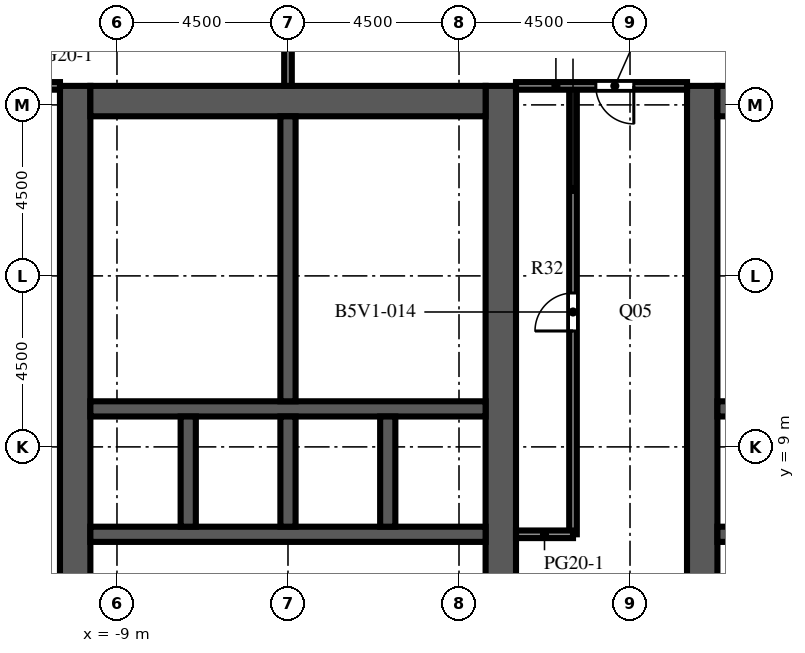
"""IFC4 building model, lengths in metres.
Left out: names, types, materials, properties, quantities, classifications, styles, units other than length and angle.
Written with IfcOpenShell. Run it as: python <this file> out.ifc"""

import sys

from ifc_helpers import new_model, si_unit, direction, frame, frame_2d, origin, place, context, subcontext, project, spatial, rectangle, extrude, element, fill, save


model = new_model("IFC4")
c1 = context("Model", 3, precision=1e-05, world=origin(), true_north=direction((0.0, 1.0)))
c2 = subcontext(c1, "Body", "Model", "MODEL_VIEW")
j1 = project(units=[si_unit("LENGTHUNIT", "METRE"), si_unit("PLANEANGLEUNIT", "RADIAN")], contexts=[c1])
p1 = place(None, origin())
s1 = spatial("IfcSite", under=j1, at=p1, CompositionType="ELEMENT")
p2 = place(p1, origin())
s2 = spatial("IfcBuilding", under=s1, at=p2, CompositionType="ELEMENT")
p3 = place(p2, frame((0.0, 0.0, 165.0)))
s3 = spatial("IfcBuildingStorey", under=s2, at=p3, CompositionType="ELEMENT", Elevation=165.0)
p4 = place(p3, frame((-10.1, -9.0, 0.0), z_axis=(0.0, 0.0, 1.0), x_axis=(0.0, 1.0, 0.0)))
e1 = element("IfcWall", 1, at=p4, inside=s3, PredefinedType="SHEAR", context=c2, shape_type="SweptSolid", body=[
    extrude(rectangle(XDim=27.5, YDim=0.8, at=frame_2d((13.75, 0.0))), origin(), (0.0, 0.0, 1.0), 4.1),
])
p5 = place(p4, frame((12.55, 0.0, 0.0)))
e2 = element("IfcOpeningElement", 2, at=p5, cuts=e1, PredefinedType="OPENING", context=c2, shape_type="SweptSolid", body=[
    extrude(rectangle(XDim=2.4, YDim=2.4, at=frame_2d((1.2, 1.2))), frame((0.0, 0.41, 0.0), z_axis=(0.0, -1.0, 0.0), x_axis=(1.0, 0.0, 0.0)), (0.0, 0.0, 1.0), 0.82),
])
p6 = place(p4, frame((6.825, 0.0, 0.0)))
e3 = element("IfcOpeningElement", 3, at=p6, cuts=e1, PredefinedType="OPENING", context=c2, shape_type="SweptSolid", body=[
    extrude(rectangle(XDim=1.2, YDim=2.1, at=frame_2d((0.6, 1.05))), frame((0.0, 0.41, 0.0), z_axis=(0.0, -1.0, 0.0), x_axis=(1.0, 0.0, 0.0)), (0.0, 0.0, 1.0), 0.82),
])
p7 = place(p4, frame((19.475, 0.0, 0.0)))
e4 = element("IfcOpeningElement", 4, at=p7, cuts=e1, PredefinedType="OPENING", context=c2, shape_type="SweptSolid", body=[
    extrude(rectangle(XDim=1.2, YDim=2.1, at=frame_2d((0.6, 1.05))), frame((0.0, 0.41, 0.0), z_axis=(0.0, -1.0, 0.0), x_axis=(1.0, 0.0, 0.0)), (0.0, 0.0, 1.0), 0.82),
])
p8 = place(p3, frame((1.1, -9.0, 0.0), z_axis=(0.0, 0.0, 1.0), x_axis=(0.0, 1.0, 0.0)))
e5 = element("IfcWall", 5, at=p8, inside=s3, PredefinedType="SHEAR", context=c2, shape_type="SweptSolid", body=[
    extrude(rectangle(XDim=27.5, YDim=0.8, at=frame_2d((13.75, 0.0))), origin(), (0.0, 0.0, 1.0), 4.1),
])
p9 = place(p8, frame((12.55, 0.0, 0.0)))
e6 = element("IfcOpeningElement", 6, at=p9, cuts=e5, PredefinedType="OPENING", context=c2, shape_type="SweptSolid", body=[
    extrude(rectangle(XDim=2.4, YDim=2.4, at=frame_2d((1.2, 1.2))), frame((0.0, 0.41, 0.0), z_axis=(0.0, -1.0, 0.0), x_axis=(1.0, 0.0, 0.0)), (0.0, 0.0, 1.0), 0.82),
])
p10 = place(p8, frame((3.95, 0.0, 0.0)))
e7 = element("IfcOpeningElement", 7, at=p10, cuts=e5, PredefinedType="OPENING", context=c2, shape_type="SweptSolid", body=[
    extrude(rectangle(XDim=1.2, YDim=2.1, at=frame_2d((0.6, 1.05))), frame((0.0, 0.41, 0.0), z_axis=(0.0, -1.0, 0.0), x_axis=(1.0, 0.0, 0.0)), (0.0, 0.0, 1.0), 0.82),
])
p11 = place(p8, frame((22.35, 0.0, 0.0)))
e8 = element("IfcOpeningElement", 8, at=p11, cuts=e5, PredefinedType="OPENING", context=c2, shape_type="SweptSolid", body=[
    extrude(rectangle(XDim=1.2, YDim=2.1, at=frame_2d((0.6, 1.05))), frame((0.0, 0.41, 0.0), z_axis=(0.0, -1.0, 0.0), x_axis=(1.0, 0.0, 0.0)), (0.0, 0.0, 1.0), 0.82),
])
p12 = place(p3, frame((-9.7, 18.1, 0.0), z_axis=(0.0, 0.0, 1.0), x_axis=(1.0, 0.0, 0.0)))
e9 = element("IfcWall", 9, at=p12, inside=s3, PredefinedType="SHEAR", context=c2, shape_type="SweptSolid", body=[
    extrude(rectangle(XDim=10.4, YDim=0.8, at=frame_2d((5.2, 0.0))), origin(), (0.0, 0.0, 1.0), 4.1),
])
p13 = place(p3, frame((-9.7, 6.7, 0.0), z_axis=(0.0, 0.0, 1.0), x_axis=(1.0, 0.0, 0.0)))
e10 = element("IfcWall", 10, at=p13, inside=s3, PredefinedType="SHEAR", context=c2, shape_type="SweptSolid", body=[
    extrude(rectangle(XDim=10.4, YDim=0.4, at=frame_2d((5.2, 0.0))), origin(), (0.0, 0.0, 1.0), 4.1),
])
p14 = place(p13, frame((3.337, 0.0, 0.0)))
e11 = element("IfcOpeningElement", 11, at=p14, cuts=e10, PredefinedType="OPENING", context=c2, shape_type="SweptSolid", body=[
    extrude(rectangle(XDim=1.1, YDim=2.1, at=frame_2d((0.55, 1.05))), frame((0.0, 0.21, 0.0), z_axis=(0.0, -1.0, 0.0), x_axis=(1.0, 0.0, 0.0)), (0.0, 0.0, 1.0), 0.42),
])
p15 = place(p13, frame((5.962, 0.0, 0.0)))
e12 = element("IfcOpeningElement", 12, at=p15, cuts=e10, PredefinedType="OPENING", context=c2, shape_type="SweptSolid", body=[
    extrude(rectangle(XDim=1.1, YDim=2.1, at=frame_2d((0.55, 1.05))), frame((0.0, 0.21, 0.0), z_axis=(0.0, -1.0, 0.0), x_axis=(1.0, 0.0, 0.0)), (0.0, 0.0, 1.0), 0.42),
])
p16 = place(p13, frame((8.663, 0.0, 0.0)))
e13 = element("IfcOpeningElement", 13, at=p16, cuts=e10, PredefinedType="OPENING", context=c2, shape_type="SweptSolid", body=[
    extrude(rectangle(XDim=1.1, YDim=2.1, at=frame_2d((0.55, 1.05))), frame((0.0, 0.21, 0.0), z_axis=(0.0, -1.0, 0.0), x_axis=(1.0, 0.0, 0.0)), (0.0, 0.0, 1.0), 0.42),
])
p17 = place(p13, frame((0.688, 0.0, 0.0)))
e14 = element("IfcOpeningElement", 14, at=p17, cuts=e10, PredefinedType="OPENING", context=c2, shape_type="SweptSolid", body=[
    extrude(rectangle(XDim=1.0, YDim=2.1, at=frame_2d((0.5, 1.05))), frame((0.0, 0.21, 0.0), z_axis=(0.0, -1.0, 0.0), x_axis=(1.0, 0.0, 0.0)), (0.0, 0.0, 1.0), 0.42),
])
p18 = place(p3, frame((-9.7, 10.0, 0.0), z_axis=(0.0, 0.0, 1.0), x_axis=(1.0, 0.0, 0.0)))
e15 = element("IfcWall", 15, at=p18, inside=s3, PredefinedType="SHEAR", context=c2, shape_type="SweptSolid", body=[
    extrude(rectangle(XDim=10.4, YDim=0.4, at=frame_2d((5.2, 0.0))), origin(), (0.0, 0.0, 1.0), 4.1),
])
for number, where, z_axis, x_axis in (
    (16, (-7.125, 6.9, 0.0), (0.0, 0.0, 1.0), (0.0, 1.0, 0.0)),
    (17, (-4.5, 6.9, 0.0), (0.0, 0.0, 1.0), (0.0, 1.0, 0.0)),
    (18, (-1.875, 6.9, 0.0), (0.0, 0.0, 1.0), (0.0, 1.0, 0.0)),
):
    element("IfcWall", number, at=place(p3, frame(where, z_axis=z_axis, x_axis=x_axis)), inside=s3, PredefinedType="SHEAR", context=c2, shape_type="SweptSolid", body=[
        extrude(rectangle(XDim=2.9, YDim=0.4, at=frame_2d((1.45, 0.0))), origin(), (0.0, 0.0, 1.0), 4.1),
    ])
p19 = place(p3, frame((-4.5, 10.2, 0.0), z_axis=(0.0, 0.0, 1.0), x_axis=(0.0, 1.0, 0.0)))
e19 = element("IfcWall", 19, at=p19, inside=s3, PredefinedType="SHEAR", context=c2, shape_type="SweptSolid", body=[
    extrude(rectangle(XDim=7.5, YDim=0.4, at=frame_2d((3.75, 0.0))), origin(), (0.0, 0.0, 1.0), 4.1),
])
p20 = place(p3, frame((6.4, -9.0, 0.0), z_axis=(0.0, 0.0, 1.0), x_axis=(0.0, 1.0, 0.0)))
e20 = element("IfcWall", 20, at=p20, inside=s3, PredefinedType="SHEAR", context=c2, shape_type="SweptSolid", body=[
    extrude(rectangle(XDim=27.5, YDim=0.8, at=frame_2d((13.75, 0.0))), origin(), (0.0, 0.0, 1.0), 4.1),
])
p21 = place(p20, frame((12.55, 0.0, 0.0)))
e21 = element("IfcOpeningElement", 21, at=p21, cuts=e20, PredefinedType="OPENING", context=c2, shape_type="SweptSolid", body=[
    extrude(rectangle(XDim=2.4, YDim=2.4, at=frame_2d((1.2, 1.2))), frame((0.0, 0.41, 0.0), z_axis=(0.0, -1.0, 0.0), x_axis=(1.0, 0.0, 0.0)), (0.0, 0.0, 1.0), 0.82),
])
p22 = place(p20, frame((3.95, 0.0, 0.0)))
e22 = element("IfcOpeningElement", 22, at=p22, cuts=e20, PredefinedType="OPENING", context=c2, shape_type="SweptSolid", body=[
    extrude(rectangle(XDim=1.2, YDim=2.1, at=frame_2d((0.6, 1.05))), frame((0.0, 0.41, 0.0), z_axis=(0.0, -1.0, 0.0), x_axis=(1.0, 0.0, 0.0)), (0.0, 0.0, 1.0), 0.82),
])
p23 = place(p20, frame((22.35, 0.0, 0.0)))
e23 = element("IfcOpeningElement", 23, at=p23, cuts=e20, PredefinedType="OPENING", context=c2, shape_type="SweptSolid", body=[
    extrude(rectangle(XDim=1.2, YDim=2.1, at=frame_2d((0.6, 1.05))), frame((0.0, 0.41, 0.0), z_axis=(0.0, -1.0, 0.0), x_axis=(1.0, 0.0, 0.0)), (0.0, 0.0, 1.0), 0.82),
])
p24 = place(p3, frame((6.8, 18.1, 0.0), z_axis=(0.0, 0.0, 1.0), x_axis=(1.0, 0.0, 0.0)))
e24 = element("IfcWall", 24, at=p24, inside=s3, PredefinedType="SHEAR", context=c2, shape_type="SweptSolid", body=[
    extrude(rectangle(XDim=10.4, YDim=0.8, at=frame_2d((5.2, 0.0))), origin(), (0.0, 0.0, 1.0), 4.1),
])
p25 = place(p3, frame((6.8, 6.7, 0.0), z_axis=(0.0, 0.0, 1.0), x_axis=(1.0, 0.0, 0.0)))
e25 = element("IfcWall", 25, at=p25, inside=s3, PredefinedType="SHEAR", context=c2, shape_type="SweptSolid", body=[
    extrude(rectangle(XDim=10.4, YDim=0.4, at=frame_2d((5.2, 0.0))), origin(), (0.0, 0.0, 1.0), 4.1),
])
p26 = place(p25, frame((3.337, 0.0, 0.0)))
e26 = element("IfcOpeningElement", 26, at=p26, cuts=e25, PredefinedType="OPENING", context=c2, shape_type="SweptSolid", body=[
    extrude(rectangle(XDim=1.1, YDim=2.1, at=frame_2d((0.55, 1.05))), frame((0.0, 0.21, 0.0), z_axis=(0.0, -1.0, 0.0), x_axis=(1.0, 0.0, 0.0)), (0.0, 0.0, 1.0), 0.42),
])
p27 = place(p25, frame((5.962, 0.0, 0.0)))
e27 = element("IfcOpeningElement", 27, at=p27, cuts=e25, PredefinedType="OPENING", context=c2, shape_type="SweptSolid", body=[
    extrude(rectangle(XDim=1.1, YDim=2.1, at=frame_2d((0.55, 1.05))), frame((0.0, 0.21, 0.0), z_axis=(0.0, -1.0, 0.0), x_axis=(1.0, 0.0, 0.0)), (0.0, 0.0, 1.0), 0.42),
])
p28 = place(p25, frame((8.663, 0.0, 0.0)))
e28 = element("IfcOpeningElement", 28, at=p28, cuts=e25, PredefinedType="OPENING", context=c2, shape_type="SweptSolid", body=[
    extrude(rectangle(XDim=1.1, YDim=2.1, at=frame_2d((0.55, 1.05))), frame((0.0, 0.21, 0.0), z_axis=(0.0, -1.0, 0.0), x_axis=(1.0, 0.0, 0.0)), (0.0, 0.0, 1.0), 0.42),
])
p29 = place(p25, frame((0.688, 0.0, 0.0)))
e29 = element("IfcOpeningElement", 29, at=p29, cuts=e25, PredefinedType="OPENING", context=c2, shape_type="SweptSolid", body=[
    extrude(rectangle(XDim=1.0, YDim=2.1, at=frame_2d((0.5, 1.05))), frame((0.0, 0.21, 0.0), z_axis=(0.0, -1.0, 0.0), x_axis=(1.0, 0.0, 0.0)), (0.0, 0.0, 1.0), 0.42),
])
p30 = place(p3, frame((6.8, 10.0, 0.0), z_axis=(0.0, 0.0, 1.0), x_axis=(1.0, 0.0, 0.0)))
e30 = element("IfcWall", 30, at=p30, inside=s3, PredefinedType="SHEAR", context=c2, shape_type="SweptSolid", body=[
    extrude(rectangle(XDim=10.4, YDim=0.4, at=frame_2d((5.2, 0.0))), origin(), (0.0, 0.0, 1.0), 4.1),
])
p31 = place(p3, frame((-0.7, 10.2, 0.0), z_axis=(0.0, 0.0, 1.0), x_axis=(0.0, 1.0, 0.0)))
e31 = element("IfcWall", 31, at=p31, inside=s3, PredefinedType="PARTITIONING", context=c2, shape_type="SweptSolid", body=[
    extrude(rectangle(XDim=2.25, YDim=0.1, at=frame_2d((1.125, 0.0))), origin(), (0.0, 0.0, 1.0), 3.65),
])
p32 = place(p31, frame((0.625, 0.0, 0.0)))
e32 = element("IfcOpeningElement", 32, at=p32, cuts=e31, PredefinedType="OPENING", context=c2, shape_type="SweptSolid", body=[
    extrude(rectangle(XDim=1.0, YDim=2.1, at=frame_2d((0.5, 1.05))), frame((0.0, 0.06, 0.0), z_axis=(0.0, -1.0, 0.0), x_axis=(1.0, 0.0, 0.0)), (0.0, 0.0, 1.0), 0.12),
])
p33 = place(p3, frame((-0.7, 12.45, 0.0), z_axis=(0.0, 0.0, 1.0), x_axis=(0.0, 1.0, 0.0)))
e33 = element("IfcWall", 33, at=p33, inside=s3, PredefinedType="PARTITIONING", context=c2, shape_type="SweptSolid", body=[
    extrude(rectangle(XDim=2.4, YDim=0.1, at=frame_2d((1.2, 0.0))), origin(), (0.0, 0.0, 1.0), 3.65),
])
p34 = place(p33, frame((0.7, 0.0, 0.0)))
e34 = element("IfcOpeningElement", 34, at=p34, cuts=e33, PredefinedType="OPENING", context=c2, shape_type="SweptSolid", body=[
    extrude(rectangle(XDim=1.0, YDim=2.1, at=frame_2d((0.5, 1.05))), frame((0.0, 0.06, 0.0), z_axis=(0.0, -1.0, 0.0), x_axis=(1.0, 0.0, 0.0)), (0.0, 0.0, 1.0), 0.12),
])
p35 = place(p3, frame((-0.7, 14.85, 0.0), z_axis=(0.0, 0.0, 1.0), x_axis=(0.0, 1.0, 0.0)))
e35 = element("IfcWall", 35, at=p35, inside=s3, PredefinedType="PARTITIONING", context=c2, shape_type="SweptSolid", body=[
    extrude(rectangle(XDim=2.85, YDim=0.1, at=frame_2d((1.425, 0.0))), origin(), (0.0, 0.0, 1.0), 3.65),
])
p36 = place(p35, frame((0.925, 0.0, 0.0)))
e36 = element("IfcOpeningElement", 36, at=p36, cuts=e35, PredefinedType="OPENING", context=c2, shape_type="SweptSolid", body=[
    extrude(rectangle(XDim=1.0, YDim=2.1, at=frame_2d((0.5, 1.05))), frame((0.0, 0.06, 0.0), z_axis=(0.0, -1.0, 0.0), x_axis=(1.0, 0.0, 0.0)), (0.0, 0.0, 1.0), 0.12),
])
for number, where, z_axis, x_axis in (
    (37, (-4.3, 12.45, 0.0), (0.0, 0.0, 1.0), (1.0, 0.0, 0.0)),
    (38, (-4.3, 14.85, 0.0), (0.0, 0.0, 1.0), (1.0, 0.0, 0.0)),
):
    element("IfcWall", number, at=place(p3, frame(where, z_axis=z_axis, x_axis=x_axis)), inside=s3, PredefinedType="PARTITIONING", context=c2, shape_type="SweptSolid", body=[
        extrude(rectangle(XDim=3.6, YDim=0.1, at=frame_2d((1.8, 0.0))), origin(), (0.0, 0.0, 1.0), 3.65),
    ])
p37 = place(p3, frame((-4.5, 18.5, 0.0), z_axis=(0.0, 0.0, 1.0), x_axis=(0.0, 1.0, 0.0)))
e39 = element("IfcWall", 39, at=p37, inside=s3, PredefinedType="PARTITIONING", context=c2, shape_type="SweptSolid", body=[
    extrude(rectangle(XDim=8.0, YDim=0.2, at=frame_2d((4.0, 0.0))), origin(), (0.0, 0.0, 1.0), 3.65),
])
p38 = place(p3, frame((3.0, 6.7, 0.0), z_axis=(0.0, 0.0, 1.0), x_axis=(0.0, 1.0, 0.0)))
e40 = element("IfcWall", 40, at=p38, inside=s3, PredefinedType="PARTITIONING", context=c2, shape_type="SweptSolid", body=[
    extrude(rectangle(XDim=11.8, YDim=0.2, at=frame_2d((5.9, 0.0))), origin(), (0.0, 0.0, 1.0), 3.65),
])
p39 = place(p38, frame((5.35, 0.0, 0.0)))
e41 = element("IfcOpeningElement", 41, at=p39, cuts=e40, PredefinedType="OPENING", context=c2, shape_type="SweptSolid", body=[
    extrude(rectangle(XDim=1.0, YDim=2.1, at=frame_2d((0.5, 1.05))), frame((0.0, 0.11, 0.0), z_axis=(0.0, -1.0, 0.0), x_axis=(1.0, 0.0, 0.0)), (0.0, 0.0, 1.0), 0.22),
])
p40 = place(p3, frame((1.5, 6.7, 0.0), z_axis=(0.0, 0.0, 1.0), x_axis=(1.0, 0.0, 0.0)))
e42 = element("IfcWall", 42, at=p40, inside=s3, PredefinedType="PARTITIONING", context=c2, shape_type="SweptSolid", body=[
    extrude(rectangle(XDim=1.5, YDim=0.2, at=frame_2d((0.75, 0.0))), origin(), (0.0, 0.0, 1.0), 3.65),
])
p41 = place(p3, frame((-13.5, 18.5, 0.0), z_axis=(0.0, 0.0, 1.0), x_axis=(1.0, 0.0, 0.0)))
e43 = element("IfcWall", 43, at=p41, inside=s3, PredefinedType="PARTITIONING", context=c2, shape_type="SweptSolid", body=[
    extrude(rectangle(XDim=3.0, YDim=0.2, at=frame_2d((1.5, 0.0))), origin(), (0.0, 0.0, 1.0), 3.65),
])
p42 = place(p41, frame((0.6, 0.0, 0.0)))
e44 = element("IfcOpeningElement", 44, at=p42, cuts=e43, PredefinedType="OPENING", context=c2, shape_type="SweptSolid", body=[
    extrude(rectangle(XDim=1.0, YDim=2.1, at=frame_2d((0.5, 1.05))), frame((0.0, 0.11, 0.0), z_axis=(0.0, -1.0, 0.0), x_axis=(1.0, 0.0, 0.0)), (0.0, 0.0, 1.0), 0.22),
])
p43 = place(p3, frame((1.5, 18.5, 0.0), z_axis=(0.0, 0.0, 1.0), x_axis=(1.0, 0.0, 0.0)))
e45 = element("IfcWall", 45, at=p43, inside=s3, PredefinedType="PARTITIONING", context=c2, shape_type="SweptSolid", body=[
    extrude(rectangle(XDim=4.5, YDim=0.2, at=frame_2d((2.25, 0.0))), origin(), (0.0, 0.0, 1.0), 3.65),
])
p44 = place(p43, frame((2.1, 0.0, 0.0)))
e46 = element("IfcOpeningElement", 46, at=p44, cuts=e45, PredefinedType="OPENING", context=c2, shape_type="SweptSolid", body=[
    extrude(rectangle(XDim=1.0, YDim=2.1, at=frame_2d((0.5, 1.05))), frame((0.0, 0.11, 0.0), z_axis=(0.0, -1.0, 0.0), x_axis=(1.0, 0.0, 0.0)), (0.0, 0.0, 1.0), 0.22),
])
p45 = place(p14, origin())
e47 = element("IfcDoor", 47, at=p45, inside=s3, OperationType="DOUBLE_DOOR_SLIDING", PredefinedType="DOOR", context=c2, shape_type="SweptSolid", body=[
    extrude(rectangle(XDim=1.1, YDim=2.1, at=frame_2d((0.55, 1.05))), frame((0.0, 0.025, 0.0), z_axis=(0.0, -1.0, 0.0), x_axis=(1.0, 0.0, 0.0)), (0.0, 0.0, 1.0), 0.05),
])
fill(e11, e47)
p46 = place(p15, origin())
e48 = element("IfcDoor", 48, at=p46, inside=s3, OperationType="DOUBLE_DOOR_SLIDING", PredefinedType="DOOR", context=c2, shape_type="SweptSolid", body=[
    extrude(rectangle(XDim=1.1, YDim=2.1, at=frame_2d((0.55, 1.05))), frame((0.0, 0.025, 0.0), z_axis=(0.0, -1.0, 0.0), x_axis=(1.0, 0.0, 0.0)), (0.0, 0.0, 1.0), 0.05),
])
fill(e12, e48)
p47 = place(p16, origin())
e49 = element("IfcDoor", 49, at=p47, inside=s3, OperationType="DOUBLE_DOOR_SLIDING", PredefinedType="DOOR", context=c2, shape_type="SweptSolid", body=[
    extrude(rectangle(XDim=1.1, YDim=2.1, at=frame_2d((0.55, 1.05))), frame((0.0, 0.025, 0.0), z_axis=(0.0, -1.0, 0.0), x_axis=(1.0, 0.0, 0.0)), (0.0, 0.0, 1.0), 0.05),
])
fill(e13, e49)
p48 = place(p5, origin())
e50 = element("IfcDoor", 50, at=p48, inside=s3, OperationType="DOUBLE_DOOR_DOUBLE_SWING", PredefinedType="DOOR", context=c2, shape_type="SweptSolid", body=[
    extrude(rectangle(XDim=2.4, YDim=2.4, at=frame_2d((1.2, 1.2))), frame((0.0, 0.025, 0.0), z_axis=(0.0, -1.0, 0.0), x_axis=(1.0, 0.0, 0.0)), (0.0, 0.0, 1.0), 0.05),
])
fill(e2, e50)
p49 = place(p9, origin())
e51 = element("IfcDoor", 51, at=p49, inside=s3, OperationType="DOUBLE_DOOR_DOUBLE_SWING", PredefinedType="DOOR", context=c2, shape_type="SweptSolid", body=[
    extrude(rectangle(XDim=2.4, YDim=2.4, at=frame_2d((1.2, 1.2))), frame((0.0, 0.025, 0.0), z_axis=(0.0, -1.0, 0.0), x_axis=(1.0, 0.0, 0.0)), (0.0, 0.0, 1.0), 0.05),
])
fill(e6, e51)
p50 = place(p21, origin())
e52 = element("IfcDoor", 52, at=p50, inside=s3, OperationType="DOUBLE_DOOR_DOUBLE_SWING", PredefinedType="DOOR", context=c2, shape_type="SweptSolid", body=[
    extrude(rectangle(XDim=2.4, YDim=2.4, at=frame_2d((1.2, 1.2))), frame((0.0, 0.025, 0.0), z_axis=(0.0, -1.0, 0.0), x_axis=(1.0, 0.0, 0.0)), (0.0, 0.0, 1.0), 0.05),
])
fill(e21, e52)
p51 = place(p7, origin())
e53 = element("IfcDoor", 53, at=p51, inside=s3, OperationType="SINGLE_SWING_LEFT", PredefinedType="DOOR", context=c2, shape_type="SweptSolid", body=[
    extrude(rectangle(XDim=1.2, YDim=2.1, at=frame_2d((0.6, 1.05))), frame((0.0, 0.025, 0.0), z_axis=(0.0, -1.0, 0.0), x_axis=(1.0, 0.0, 0.0)), (0.0, 0.0, 1.0), 0.05),
])
fill(e4, e53)
p52 = place(p17, origin())
e54 = element("IfcDoor", 54, at=p52, inside=s3, OperationType="SINGLE_SWING_LEFT", PredefinedType="DOOR", context=c2, shape_type="SweptSolid", body=[
    extrude(rectangle(XDim=1.0, YDim=2.1, at=frame_2d((0.5, 1.05))), frame((0.0, 0.025, 0.0), z_axis=(0.0, -1.0, 0.0), x_axis=(1.0, 0.0, 0.0)), (0.0, 0.0, 1.0), 0.05),
])
fill(e14, e54)
p53 = place(p11, origin())
e55 = element("IfcDoor", 55, at=p53, inside=s3, OperationType="SINGLE_SWING_LEFT", PredefinedType="DOOR", context=c2, shape_type="SweptSolid", body=[
    extrude(rectangle(XDim=1.2, YDim=2.1, at=frame_2d((0.6, 1.05))), frame((0.0, 0.375, 0.0), z_axis=(0.0, -1.0, 0.0), x_axis=(1.0, 0.0, 0.0)), (0.0, 0.0, 1.0), 0.05),
])
fill(e8, e55)
p54 = place(p32, origin())
e56 = element("IfcDoor", 56, at=p54, inside=s3, OperationType="SINGLE_SWING_RIGHT", PredefinedType="DOOR", context=c2, shape_type="SweptSolid", body=[
    extrude(rectangle(XDim=1.0, YDim=2.1, at=frame_2d((0.5, 1.05))), frame((0.0, 0.025, 0.0), z_axis=(0.0, -1.0, 0.0), x_axis=(1.0, 0.0, 0.0)), (0.0, 0.0, 1.0), 0.05),
])
fill(e32, e56)
p55 = place(p34, origin())
e57 = element("IfcDoor", 57, at=p55, inside=s3, OperationType="SINGLE_SWING_LEFT", PredefinedType="DOOR", context=c2, shape_type="SweptSolid", body=[
    extrude(rectangle(XDim=1.0, YDim=2.1, at=frame_2d((0.5, 1.05))), frame((0.0, 0.025, 0.0), z_axis=(0.0, -1.0, 0.0), x_axis=(1.0, 0.0, 0.0)), (0.0, 0.0, 1.0), 0.05),
])
fill(e34, e57)
p56 = place(p36, origin())
e58 = element("IfcDoor", 58, at=p56, inside=s3, OperationType="SINGLE_SWING_RIGHT", PredefinedType="DOOR", context=c2, shape_type="SweptSolid", body=[
    extrude(rectangle(XDim=1.0, YDim=2.1, at=frame_2d((0.5, 1.05))), frame((0.0, 0.025, 0.0), z_axis=(0.0, -1.0, 0.0), x_axis=(1.0, 0.0, 0.0)), (0.0, 0.0, 1.0), 0.05),
])
fill(e36, e58)
p57 = place(p23, origin())
e59 = element("IfcDoor", 59, at=p57, inside=s3, OperationType="SINGLE_SWING_RIGHT", PredefinedType="DOOR", context=c2, shape_type="SweptSolid", body=[
    extrude(rectangle(XDim=1.2, YDim=2.1, at=frame_2d((0.6, 1.05))), frame((0.0, -0.325, 0.0), z_axis=(0.0, -1.0, 0.0), x_axis=(1.0, 0.0, 0.0)), (0.0, 0.0, 1.0), 0.05),
])
fill(e23, e59)
p58 = place(p39, origin())
e60 = element("IfcDoor", 60, at=p58, inside=s3, OperationType="SINGLE_SWING_LEFT", PredefinedType="DOOR", context=c2, shape_type="SweptSolid", body=[
    extrude(rectangle(XDim=1.0, YDim=2.1, at=frame_2d((0.5, 1.05))), frame((0.0, 0.025, 0.0), z_axis=(0.0, -1.0, 0.0), x_axis=(1.0, 0.0, 0.0)), (0.0, 0.0, 1.0), 0.05),
])
fill(e41, e60)
p59 = place(p44, origin())
e61 = element("IfcDoor", 61, at=p59, inside=s3, OperationType="SINGLE_SWING_RIGHT", PredefinedType="DOOR", context=c2, shape_type="SweptSolid", body=[
    extrude(rectangle(XDim=1.0, YDim=2.1, at=frame_2d((0.5, 1.05))), frame((0.0, 0.025, 0.0), z_axis=(0.0, -1.0, 0.0), x_axis=(1.0, 0.0, 0.0)), (0.0, 0.0, 1.0), 0.05),
])
fill(e46, e61)
save(model, sys.argv[1])
